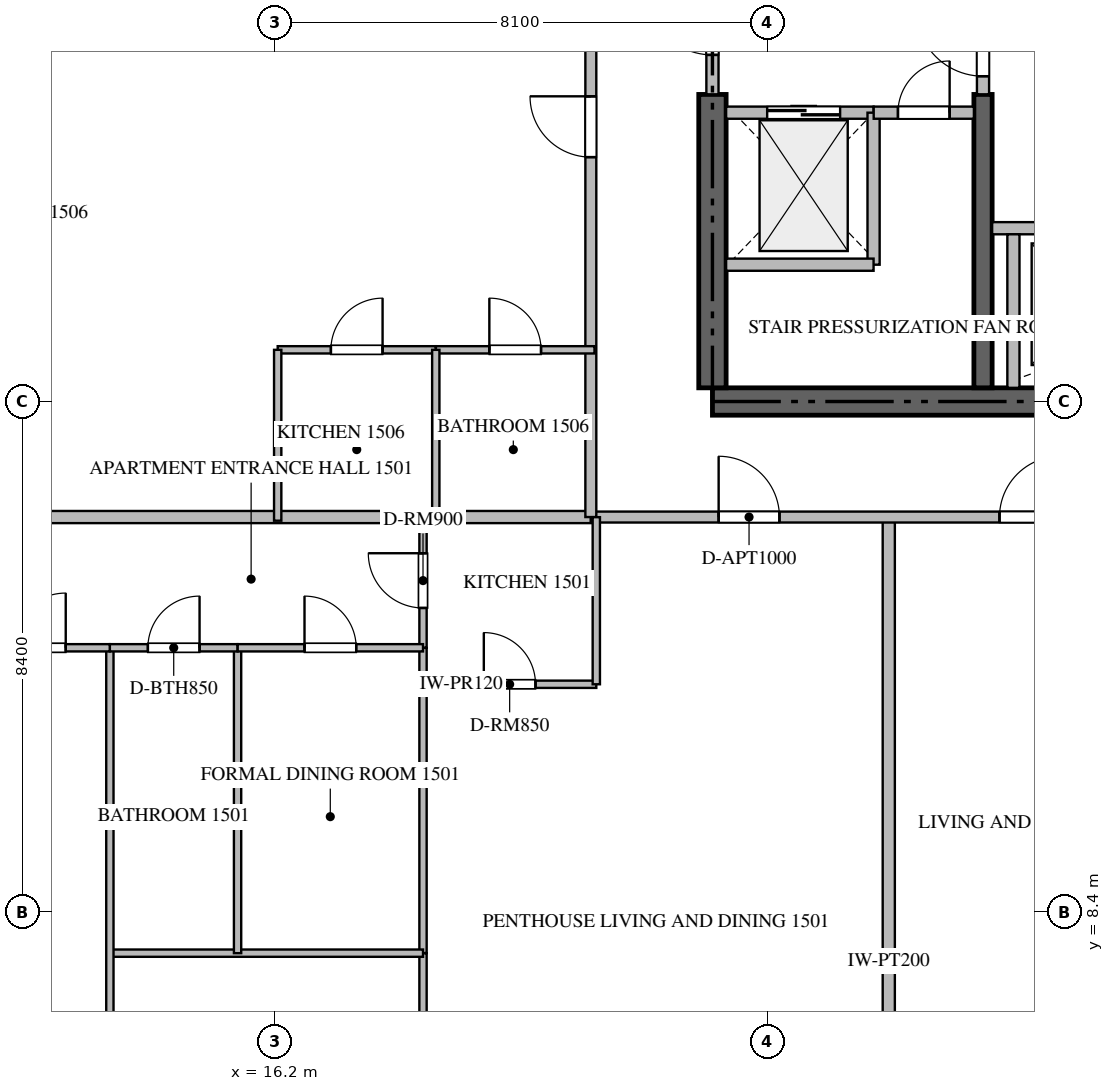
"""IFC4 building model, lengths in metres.
Left out: names, types, materials, properties, quantities, classifications, styles, units other than length and angle.
Written with IfcOpenShell. Run it as: python <this file> out.ifc"""

import sys

from ifc_helpers import new_model, si_unit, direction, frame, frame_2d, origin, place, context, subcontext, project, spatial, rectangle, extrude, source, transform, mapped, element, fill, save


model = new_model("IFC4")
c1 = context("Model", 3, precision=1e-05, world=origin(), true_north=direction((0.0, 1.0)))
c2 = subcontext(c1, "Body", "Model", "MODEL_VIEW")
j1 = project(units=[si_unit("LENGTHUNIT", "METRE"), si_unit("PLANEANGLEUNIT", "RADIAN")], contexts=[c1])
p1 = place(None, origin())
s1 = spatial("IfcSite", under=j1, at=p1, CompositionType="ELEMENT")
p2 = place(p1, origin())
s2 = spatial("IfcBuilding", under=s1, at=p2, CompositionType="ELEMENT")
p3 = place(p2, frame((0.0, 0.0, 64.2)))
s3 = spatial("IfcBuildingStorey", under=s2, at=p3, CompositionType="ELEMENT", Elevation=64.2)
p4 = place(p3, frame((23.4, 16.8, -0.26), z_axis=(0.0, 0.0, 1.0), x_axis=(1.0, 0.0, 0.0)))
e1 = element("IfcWall", 1, at=p4, inside=s3, PredefinedType="SHEAR", context=c2, shape_type="SweptSolid", body=[
    extrude(rectangle(XDim=18.0, YDim=0.45, at=frame_2d((9.0, 0.0))), origin(), (0.0, 0.0, 1.0), 3.748),
])
p5 = place(p3, frame((23.4, 17.025, -0.26), z_axis=(0.0, 0.0, 1.0), x_axis=(0.0, 1.0, 0.0)))
e2 = element("IfcWall", 2, at=p5, inside=s3, PredefinedType="SHEAR", context=c2, shape_type="SweptSolid", body=[
    extrude(rectangle(XDim=4.825, YDim=0.45, at=frame_2d((2.413, 0.0))), origin(), (0.0, 0.0, 1.0), 3.748),
])
p6 = place(p3, frame((27.85, 17.025, -0.26), z_axis=(0.0, 0.0, 1.0), x_axis=(0.0, 1.0, 0.0)))
e3 = element("IfcWall", 3, at=p6, inside=s3, PredefinedType="SHEAR", context=c2, shape_type="SweptSolid", body=[
    extrude(rectangle(XDim=4.825, YDim=0.3, at=frame_2d((2.413, 0.0))), origin(), (0.0, 0.0, 1.0), 3.748),
])
p7 = place(p3, frame((23.625, 21.55, 0.0), z_axis=(0.0, 0.0, 1.0), x_axis=(1.0, 0.0, 0.0)))
e4 = element("IfcWall", 4, at=p7, inside=s3, PredefinedType="STANDARD", context=c2, shape_type="SweptSolid", body=[
    extrude(rectangle(XDim=2.425, YDim=0.2, at=frame_2d((1.212, 0.0))), origin(), (0.0, 0.0, 1.0), 3.49),
])
p8 = place(p7, frame((0.675, 0.0, 0.0)))
e5 = element("IfcOpeningElement", 5, at=p8, cuts=e4, PredefinedType="OPENING", context=c2, shape_type="SweptSolid", body=[
    extrude(rectangle(XDim=1.2, YDim=2.2, at=frame_2d((0.6, 1.1))), frame((0.0, 0.11, 0.0), z_axis=(0.0, -1.0, 0.0), x_axis=(1.0, 0.0, 0.0)), (0.0, 0.0, 1.0), 0.22),
])
p9 = place(p3, frame((28.0, 19.65, 0.0), z_axis=(0.0, 0.0, 1.0), x_axis=(1.0, 0.0, 0.0)))
e6 = element("IfcWall", 6, at=p9, inside=s3, PredefinedType="STANDARD", context=c2, shape_type="SweptSolid", body=[
    extrude(rectangle(XDim=2.65, YDim=0.2, at=frame_2d((1.325, 0.0))), origin(), (0.0, 0.0, 1.0), 3.49),
])
p10 = place(p9, frame((0.9, 0.0, 0.0)))
e7 = element("IfcOpeningElement", 7, at=p10, cuts=e6, PredefinedType="OPENING", context=c2, shape_type="SweptSolid", body=[
    extrude(rectangle(XDim=1.1, YDim=2.2, at=frame_2d((0.55, 1.1))), frame((0.0, 0.11, 0.0), z_axis=(0.0, -1.0, 0.0), x_axis=(1.0, 0.0, 0.0)), (0.0, 0.0, 1.0), 0.22),
])
p11 = place(p3, frame((28.35, 17.025, 0.0), z_axis=(0.0, 0.0, 1.0), x_axis=(0.0, 1.0, 0.0)))
e8 = element("IfcWall", 8, at=p11, inside=s3, PredefinedType="STANDARD", context=c2, shape_type="SweptSolid", body=[
    extrude(rectangle(XDim=2.525, YDim=0.2, at=frame_2d((1.263, 0.0))), origin(), (0.0, 0.0, 1.0), 3.49),
])
p12 = place(p3, frame((26.05, 19.05, 0.0), z_axis=(0.0, 0.0, 1.0), x_axis=(0.0, 1.0, 0.0)))
e9 = element("IfcWall", 9, at=p12, inside=s3, PredefinedType="STANDARD", context=c2, shape_type="SweptSolid", body=[
    extrude(rectangle(XDim=2.5, YDim=0.2, at=frame_2d((1.25, 0.0))), origin(), (0.0, 0.0, 1.0), 3.49),
])
p13 = place(p3, frame((23.625, 19.05, 0.0), z_axis=(0.0, 0.0, 1.0), x_axis=(1.0, 0.0, 0.0)))
e10 = element("IfcWall", 10, at=p13, inside=s3, PredefinedType="STANDARD", context=c2, shape_type="SweptSolid", body=[
    extrude(rectangle(XDim=2.425, YDim=0.2, at=frame_2d((1.212, 0.0))), origin(), (0.0, 0.0, 1.0), 3.49),
])
p14 = place(p3, frame((26.052, 21.55, 0.0), z_axis=(0.0, 0.0, 1.0), x_axis=(1.0, 0.0, 0.0)))
e11 = element("IfcWall", 11, at=p14, inside=s3, PredefinedType="STANDARD", context=c2, shape_type="SweptSolid", body=[
    extrude(rectangle(XDim=1.648, YDim=0.2, at=frame_2d((0.824, 0.0))), origin(), (0.0, 0.0, 1.0), 3.49),
])
p15 = place(p14, frame((0.399, 0.0, 0.0)))
e12 = element("IfcOpeningElement", 12, at=p15, cuts=e11, PredefinedType="OPENING", context=c2, shape_type="SweptSolid", body=[
    extrude(rectangle(XDim=0.85, YDim=2.1, at=frame_2d((0.425, 1.05))), frame((0.0, 0.11, 0.0), z_axis=(0.0, -1.0, 0.0), x_axis=(1.0, 0.0, 0.0)), (0.0, 0.0, 1.0), 0.22),
])
p16 = place(p3, frame((23.4, 21.852, 0.0), z_axis=(0.0, 0.0, 1.0), x_axis=(0.0, 1.0, 0.0)))
e13 = element("IfcWall", 13, at=p16, inside=s3, PredefinedType="STANDARD", context=c2, shape_type="SweptSolid", body=[
    extrude(rectangle(XDim=2.396, YDim=0.2, at=frame_2d((1.198, 0.0))), origin(), (0.0, 0.0, 1.0), 3.49),
])
p17 = place(p16, frame((0.648, 0.0, 0.0)))
e14 = element("IfcOpeningElement", 14, at=p17, cuts=e13, PredefinedType="OPENING", context=c2, shape_type="SweptSolid", body=[
    extrude(rectangle(XDim=1.1, YDim=2.15, at=frame_2d((0.55, 1.075))), frame((0.0, 0.11, 0.0), z_axis=(0.0, -1.0, 0.0), x_axis=(1.0, 0.0, 0.0)), (0.0, 0.0, 1.0), 0.22),
])
p18 = place(p3, frame((27.85, 21.852, 0.0), z_axis=(0.0, 0.0, 1.0), x_axis=(0.0, 1.0, 0.0)))
e15 = element("IfcWall", 15, at=p18, inside=s3, PredefinedType="STANDARD", context=c2, shape_type="SweptSolid", body=[
    extrude(rectangle(XDim=1.696, YDim=0.2, at=frame_2d((0.848, 0.0))), origin(), (0.0, 0.0, 1.0), 3.49),
])
p19 = place(p18, frame((0.298, 0.0, 0.0)))
e16 = element("IfcOpeningElement", 16, at=p19, cuts=e15, PredefinedType="OPENING", context=c2, shape_type="SweptSolid", body=[
    extrude(rectangle(XDim=1.1, YDim=2.15, at=frame_2d((0.55, 1.075))), frame((0.0, 0.11, 0.0), z_axis=(0.0, -1.0, 0.0), x_axis=(1.0, 0.0, 0.0)), (0.0, 0.0, 1.0), 0.22),
])
p20 = place(p3, frame((26.3, 0.282, 0.0), z_axis=(0.0, 0.0, 1.0), x_axis=(0.0, 1.0, 0.0)))
e17 = element("IfcWall", 17, at=p20, inside=s3, PredefinedType="PARTITIONING", context=c2, shape_type="SweptSolid", body=[
    extrude(rectangle(XDim=14.618, YDim=0.2, at=frame_2d((7.309, 0.0))), origin(), (0.0, 0.0, 1.0), 3.49),
])
p21 = place(p3, frame((6.082, 14.9, 0.0), z_axis=(0.0, 0.0, 1.0), x_axis=(1.0, 0.0, 0.0)))
e18 = element("IfcWall", 18, at=p21, inside=s3, PredefinedType="PARTITIONING", context=c2, shape_type="SweptSolid", body=[
    extrude(rectangle(XDim=15.318, YDim=0.2, at=frame_2d((7.659, 0.0))), origin(), (0.0, 0.0, 1.0), 3.49),
])
p22 = place(p3, frame((21.402, 14.9, 0.0), z_axis=(0.0, 0.0, 1.0), x_axis=(1.0, 0.0, 0.0)))
e19 = element("IfcWall", 19, at=p22, inside=s3, PredefinedType="PARTITIONING", context=c2, shape_type="SweptSolid", body=[
    extrude(rectangle(XDim=21.996, YDim=0.18, at=frame_2d((10.998, 0.0))), origin(), (0.0, 0.0, 1.0), 3.49),
])
p23 = place(p22, frame((2.1, 0.0, 0.0)))
e20 = element("IfcOpeningElement", 20, at=p23, cuts=e19, PredefinedType="OPENING", context=c2, shape_type="SweptSolid", body=[
    extrude(rectangle(XDim=1.0, YDim=2.15, at=frame_2d((0.5, 1.075))), frame((0.0, 0.1, 0.0), z_axis=(0.0, -1.0, 0.0), x_axis=(1.0, 0.0, 0.0)), (0.0, 0.0, 1.0), 0.2),
])
p24 = place(p22, frame((6.719, 0.0, 0.0)))
e21 = element("IfcOpeningElement", 21, at=p24, cuts=e19, PredefinedType="OPENING", context=c2, shape_type="SweptSolid", body=[
    extrude(rectangle(XDim=1.0, YDim=2.15, at=frame_2d((0.5, 1.075))), frame((0.0, 0.1, 0.0), z_axis=(0.0, -1.0, 0.0), x_axis=(1.0, 0.0, 0.0)), (0.0, 0.0, 1.0), 0.2),
])
p25 = place(p22, frame((18.896, 0.0, 0.0)))
e22 = element("IfcOpeningElement", 22, at=p25, cuts=e19, PredefinedType="OPENING", context=c2, shape_type="SweptSolid", body=[
    extrude(rectangle(XDim=1.0, YDim=2.15, at=frame_2d((0.5, 1.075))), frame((0.0, 0.1, 0.0), z_axis=(0.0, -1.0, 0.0), x_axis=(1.0, 0.0, 0.0)), (0.0, 0.0, 1.0), 0.2),
])
p26 = place(p3, frame((21.4, 14.9, 0.0), z_axis=(0.0, 0.0, 1.0), x_axis=(0.0, 1.0, 0.0)))
e23 = element("IfcWall", 23, at=p26, inside=s3, PredefinedType="PARTITIONING", context=c2, shape_type="SweptSolid", body=[
    extrude(rectangle(XDim=20.6, YDim=0.18, at=frame_2d((10.3, 0.0))), origin(), (0.0, 0.0, 1.0), 3.49),
])
p27 = place(p26, frame((5.919, 0.0, 0.0)))
e24 = element("IfcOpeningElement", 24, at=p27, cuts=e23, PredefinedType="OPENING", context=c2, shape_type="SweptSolid", body=[
    extrude(rectangle(XDim=1.0, YDim=2.15, at=frame_2d((0.5, 1.075))), frame((0.0, 0.1, 0.0), z_axis=(0.0, -1.0, 0.0), x_axis=(1.0, 0.0, 0.0)), (0.0, 0.0, 1.0), 0.2),
])
p28 = place(p26, frame((17.64, 0.0, 0.0)))
e25 = element("IfcOpeningElement", 25, at=p28, cuts=e23, PredefinedType="OPENING", context=c2, shape_type="SweptSolid", body=[
    extrude(rectangle(XDim=1.0, YDim=2.15, at=frame_2d((0.5, 1.075))), frame((0.0, 0.1, 0.0), z_axis=(0.0, -1.0, 0.0), x_axis=(1.0, 0.0, 0.0)), (0.0, 0.0, 1.0), 0.2),
])
p29 = place(p3, frame((18.64, 12.15, 0.0), z_axis=(0.0, 0.0, 1.0), x_axis=(1.0, 0.0, 0.0)))
e26 = element("IfcWall", 26, at=p29, inside=s3, PredefinedType="PARTITIONING", context=c2, shape_type="SweptSolid", body=[
    extrude(rectangle(XDim=2.85, YDim=0.12, at=frame_2d((1.425, 0.0))), origin(), (0.0, 0.0, 1.0), 3.49),
])
p30 = place(p29, frame((1.0, 0.0, 0.0)))
e27 = element("IfcOpeningElement", 27, at=p30, cuts=e26, PredefinedType="OPENING", context=c2, shape_type="SweptSolid", body=[
    extrude(rectangle(XDim=0.85, YDim=2.1, at=frame_2d((0.425, 1.05))), frame((0.0, 0.07, 0.0), z_axis=(0.0, -1.0, 0.0), x_axis=(1.0, 0.0, 0.0)), (0.0, 0.0, 1.0), 0.14),
])
p31 = place(p3, frame((21.49, 12.15, 0.0), z_axis=(0.0, 0.0, 1.0), x_axis=(0.0, 1.0, 0.0)))
e28 = element("IfcWall", 28, at=p31, inside=s3, PredefinedType="PARTITIONING", context=c2, shape_type="SweptSolid", body=[
    extrude(rectangle(XDim=2.748, YDim=0.12, at=frame_2d((1.374, 0.0))), origin(), (0.0, 0.0, 1.0), 3.49),
])
p32 = place(p3, frame((18.64, 12.75, 0.0), z_axis=(0.0, 0.0, 1.0), x_axis=(0.0, 1.0, 0.0)))
e29 = element("IfcWall", 29, at=p32, inside=s3, PredefinedType="PARTITIONING", context=c2, shape_type="SweptSolid", body=[
    extrude(rectangle(XDim=2.21, YDim=0.12, at=frame_2d((1.105, 0.0))), origin(), (0.0, 0.0, 1.0), 3.49),
])
p33 = place(p32, frame((0.655, 0.0, 0.0)))
e30 = element("IfcOpeningElement", 30, at=p33, cuts=e29, PredefinedType="OPENING", context=c2, shape_type="SweptSolid", body=[
    extrude(rectangle(XDim=0.9, YDim=2.1, at=frame_2d((0.45, 1.05))), frame((0.0, 0.07, 0.0), z_axis=(0.0, -1.0, 0.0), x_axis=(1.0, 0.0, 0.0)), (0.0, 0.0, 1.0), 0.14),
])
p34 = place(p3, frame((18.64, 0.295, 0.0), z_axis=(0.0, 0.0, 1.0), x_axis=(0.0, 1.0, 0.0)))
e31 = element("IfcWall", 31, at=p34, inside=s3, PredefinedType="PARTITIONING", context=c2, shape_type="SweptSolid", body=[
    extrude(rectangle(XDim=7.433, YDim=0.12, at=frame_2d((3.717, 0.0))), origin(), (0.0, 0.0, 1.0), 3.49),
])
p35 = place(p34, frame((3.593, 0.0, 0.0)))
e32 = element("IfcOpeningElement", 32, at=p35, cuts=e31, PredefinedType="OPENING", context=c2, shape_type="SweptSolid", body=[
    extrude(rectangle(XDim=0.9, YDim=2.1, at=frame_2d((0.45, 1.05))), frame((0.0, 0.07, 0.0), z_axis=(0.0, -1.0, 0.0), x_axis=(1.0, 0.0, 0.0)), (0.0, 0.0, 1.0), 0.14),
])
p36 = place(p3, frame((18.64, 7.73, 0.0), z_axis=(0.0, 0.0, 1.0), x_axis=(0.0, 1.0, 0.0)))
e33 = element("IfcWall", 33, at=p36, inside=s3, PredefinedType="PARTITIONING", context=c2, shape_type="SweptSolid", body=[
    extrude(rectangle(XDim=5.018, YDim=0.12, at=frame_2d((2.509, 0.0))), origin(), (0.0, 0.0, 1.0), 3.49),
])
p37 = place(p3, frame((13.49, 7.728, 0.0), z_axis=(0.0, 0.0, 1.0), x_axis=(1.0, 0.0, 0.0)))
e34 = element("IfcWall", 34, at=p37, inside=s3, PredefinedType="PARTITIONING", context=c2, shape_type="SweptSolid", body=[
    extrude(rectangle(XDim=5.15, YDim=0.12, at=frame_2d((2.575, 0.0))), origin(), (0.0, 0.0, 1.0), 3.49),
])
p38 = place(p3, frame((13.49, 4.495, 0.0), z_axis=(0.0, 0.0, 1.0), x_axis=(0.0, 1.0, 0.0)))
e35 = element("IfcWall", 35, at=p38, inside=s3, PredefinedType="PARTITIONING", context=c2, shape_type="SweptSolid", body=[
    extrude(rectangle(XDim=8.255, YDim=0.12, at=frame_2d((4.127, 0.0))), origin(), (0.0, 0.0, 1.0), 3.49),
])
p39 = place(p3, frame((15.59, 7.728, 0.0), z_axis=(0.0, 0.0, 1.0), x_axis=(0.0, 1.0, 0.0)))
e36 = element("IfcWall", 36, at=p39, inside=s3, PredefinedType="PARTITIONING", context=c2, shape_type="SweptSolid", body=[
    extrude(rectangle(XDim=5.022, YDim=0.12, at=frame_2d((2.511, 0.0))), origin(), (0.0, 0.0, 1.0), 3.49),
])
p40 = place(p3, frame((13.49, 12.75, 0.0), z_axis=(0.0, 0.0, 1.0), x_axis=(1.0, 0.0, 0.0)))
e37 = element("IfcWall", 37, at=p40, inside=s3, PredefinedType="PARTITIONING", context=c2, shape_type="SweptSolid", body=[
    extrude(rectangle(XDim=2.1, YDim=0.12, at=frame_2d((1.05, 0.0))), origin(), (0.0, 0.0, 1.0), 3.49),
])
p41 = place(p40, frame((0.625, 0.0, 0.0)))
e38 = element("IfcOpeningElement", 38, at=p41, cuts=e37, PredefinedType="OPENING", context=c2, shape_type="SweptSolid", body=[
    extrude(rectangle(XDim=0.85, YDim=2.1, at=frame_2d((0.425, 1.05))), frame((0.0, 0.07, 0.0), z_axis=(0.0, -1.0, 0.0), x_axis=(1.0, 0.0, 0.0)), (0.0, 0.0, 1.0), 0.14),
])
p42 = place(p3, frame((15.592, 12.75, 0.0), z_axis=(0.0, 0.0, 1.0), x_axis=(1.0, 0.0, 0.0)))
e39 = element("IfcWall", 39, at=p42, inside=s3, PredefinedType="PARTITIONING", context=c2, shape_type="SweptSolid", body=[
    extrude(rectangle(XDim=3.048, YDim=0.12, at=frame_2d((1.524, 0.0))), origin(), (0.0, 0.0, 1.0), 3.49),
])
p43 = place(p42, frame((1.099, 0.0, 0.0)))
e40 = element("IfcOpeningElement", 40, at=p43, cuts=e39, PredefinedType="OPENING", context=c2, shape_type="SweptSolid", body=[
    extrude(rectangle(XDim=0.85, YDim=2.1, at=frame_2d((0.425, 1.05))), frame((0.0, 0.07, 0.0), z_axis=(0.0, -1.0, 0.0), x_axis=(1.0, 0.0, 0.0)), (0.0, 0.0, 1.0), 0.14),
])
p44 = place(p3, frame((11.14, 12.75, 0.0), z_axis=(0.0, 0.0, 1.0), x_axis=(1.0, 0.0, 0.0)))
e41 = element("IfcWall", 41, at=p44, inside=s3, PredefinedType="PARTITIONING", context=c2, shape_type="SweptSolid", body=[
    extrude(rectangle(XDim=2.348, YDim=0.12, at=frame_2d((1.174, 0.0))), origin(), (0.0, 0.0, 1.0), 3.49),
])
p45 = place(p44, frame((0.724, 0.0, 0.0)))
e42 = element("IfcOpeningElement", 42, at=p45, cuts=e41, PredefinedType="OPENING", context=c2, shape_type="SweptSolid", body=[
    extrude(rectangle(XDim=0.9, YDim=2.1, at=frame_2d((0.45, 1.05))), frame((0.0, 0.07, 0.0), z_axis=(0.0, -1.0, 0.0), x_axis=(1.0, 0.0, 0.0)), (0.0, 0.0, 1.0), 0.14),
])
p46 = place(p3, frame((16.25, 17.65, 0.0), z_axis=(0.0, 0.0, 1.0), x_axis=(1.0, 0.0, 0.0)))
e43 = element("IfcWall", 43, at=p46, inside=s3, PredefinedType="PARTITIONING", context=c2, shape_type="SweptSolid", body=[
    extrude(rectangle(XDim=2.6, YDim=0.12, at=frame_2d((1.3, 0.0))), origin(), (0.0, 0.0, 1.0), 3.49),
])
p47 = place(p46, frame((0.875, 0.0, 0.0)))
e44 = element("IfcOpeningElement", 44, at=p47, cuts=e43, PredefinedType="OPENING", context=c2, shape_type="SweptSolid", body=[
    extrude(rectangle(XDim=0.85, YDim=2.1, at=frame_2d((0.425, 1.05))), frame((0.0, 0.07, 0.0), z_axis=(0.0, -1.0, 0.0), x_axis=(1.0, 0.0, 0.0)), (0.0, 0.0, 1.0), 0.14),
])
p48 = place(p3, frame((18.852, 17.65, 0.0), z_axis=(0.0, 0.0, 1.0), x_axis=(1.0, 0.0, 0.0)))
e45 = element("IfcWall", 45, at=p48, inside=s3, PredefinedType="PARTITIONING", context=c2, shape_type="SweptSolid", body=[
    extrude(rectangle(XDim=2.608, YDim=0.12, at=frame_2d((1.304, 0.0))), origin(), (0.0, 0.0, 1.0), 3.49),
])
p49 = place(p48, frame((0.879, 0.0, 0.0)))
e46 = element("IfcOpeningElement", 46, at=p49, cuts=e45, PredefinedType="OPENING", context=c2, shape_type="SweptSolid", body=[
    extrude(rectangle(XDim=0.85, YDim=2.1, at=frame_2d((0.425, 1.05))), frame((0.0, 0.07, 0.0), z_axis=(0.0, -1.0, 0.0), x_axis=(1.0, 0.0, 0.0)), (0.0, 0.0, 1.0), 0.14),
])
for number, where, z_axis, x_axis in (
    (47, (18.85, 14.84, 0.0), (0.0, 0.0, 1.0), (0.0, 1.0, 0.0)),
    (48, (16.25, 14.84, 0.0), (0.0, 0.0, 1.0), (0.0, 1.0, 0.0)),
):
    element("IfcWall", number, at=place(p3, frame(where, z_axis=z_axis, x_axis=x_axis)), inside=s3, PredefinedType="PARTITIONING", context=c2, shape_type="SweptSolid", body=[
        extrude(rectangle(XDim=2.81, YDim=0.12, at=frame_2d((1.405, 0.0))), origin(), (0.0, 0.0, 1.0), 3.49),
    ])
m1 = source(origin(), c2, "Body", "SweptSolid", [
    extrude(rectangle(XDim=1.2, YDim=2.2, at=frame_2d((0.6, 1.1))), frame((0.0, 0.025, 0.0), z_axis=(0.0, -1.0, 0.0), x_axis=(1.0, 0.0, 0.0)), (0.0, 0.0, 1.0), 0.05),
])
p50 = place(p8, origin())
e49 = element("IfcDoor", 49, at=p50, inside=s3, OperationType="DOUBLE_DOOR_SLIDING", PredefinedType="DOOR", context=c2, shape_type="MappedRepresentation", body=[
    mapped(m1, transform((0.0, 0.0, 0.0), scale=1.0)),
])
fill(e5, e49)
m2 = source(origin(), c2, "Body", "SweptSolid", [
    extrude(rectangle(XDim=0.85, YDim=2.1, at=frame_2d((0.425, 1.05))), frame((0.0, 0.025, 0.0), z_axis=(0.0, -1.0, 0.0), x_axis=(1.0, 0.0, 0.0)), (0.0, 0.0, 1.0), 0.05),
])
p51 = place(p15, origin())
e50 = element("IfcDoor", 50, at=p51, inside=s3, OperationType="SINGLE_SWING_RIGHT", PredefinedType="DOOR", context=c2, shape_type="MappedRepresentation", body=[
    mapped(m2, transform((0.0, 0.0, 0.0), scale=1.0)),
])
fill(e12, e50)
m3 = source(origin(), c2, "Body", "SweptSolid", [
    extrude(rectangle(XDim=1.1, YDim=2.15, at=frame_2d((0.55, 1.075))), frame((0.0, 0.025, 0.0), z_axis=(0.0, -1.0, 0.0), x_axis=(1.0, 0.0, 0.0)), (0.0, 0.0, 1.0), 0.05),
])
p52 = place(p17, origin())
e51 = element("IfcDoor", 51, at=p52, inside=s3, OperationType="SINGLE_SWING_RIGHT", PredefinedType="DOOR", context=c2, shape_type="MappedRepresentation", body=[
    mapped(m3, transform((0.0, 0.0, 0.0), scale=1.0)),
])
fill(e14, e51)
p53 = place(p19, origin())
e52 = element("IfcDoor", 52, at=p53, inside=s3, OperationType="SINGLE_SWING_RIGHT", PredefinedType="DOOR", context=c2, shape_type="MappedRepresentation", body=[
    mapped(m3, transform((0.0, 0.0, 0.0), scale=1.0)),
])
fill(e16, e52)
m4 = source(origin(), c2, "Body", "SweptSolid", [
    extrude(rectangle(XDim=1.0, YDim=2.15, at=frame_2d((0.5, 1.075))), frame((0.0, 0.025, 0.0), z_axis=(0.0, -1.0, 0.0), x_axis=(1.0, 0.0, 0.0)), (0.0, 0.0, 1.0), 0.05),
])
p54 = place(p23, origin())
e53 = element("IfcDoor", 53, at=p54, inside=s3, OperationType="SINGLE_SWING_LEFT", PredefinedType="DOOR", context=c2, shape_type="MappedRepresentation", body=[
    mapped(m4, transform((0.0, 0.0, 0.0), scale=1.0)),
])
fill(e20, e53)
p55 = place(p24, origin())
e54 = element("IfcDoor", 54, at=p55, inside=s3, OperationType="SINGLE_SWING_RIGHT", PredefinedType="DOOR", context=c2, shape_type="MappedRepresentation", body=[
    mapped(m4, transform((0.0, 0.0, 0.0), scale=1.0)),
])
fill(e21, e54)
p56 = place(p27, origin())
e55 = element("IfcDoor", 55, at=p56, inside=s3, OperationType="SINGLE_SWING_RIGHT", PredefinedType="DOOR", context=c2, shape_type="MappedRepresentation", body=[
    mapped(m4, transform((0.0, 0.0, 0.0), scale=1.0)),
])
fill(e24, e55)
p57 = place(p30, origin())
e56 = element("IfcDoor", 56, at=p57, inside=s3, OperationType="SINGLE_SWING_LEFT", PredefinedType="DOOR", context=c2, shape_type="MappedRepresentation", body=[
    mapped(m2, transform((0.0, 0.0, 0.0), scale=1.0)),
])
fill(e27, e56)
m5 = source(origin(), c2, "Body", "SweptSolid", [
    extrude(rectangle(XDim=0.9, YDim=2.1, at=frame_2d((0.45, 1.05))), frame((0.0, 0.025, 0.0), z_axis=(0.0, -1.0, 0.0), x_axis=(1.0, 0.0, 0.0)), (0.0, 0.0, 1.0), 0.05),
])
p58 = place(p33, origin())
e57 = element("IfcDoor", 57, at=p58, inside=s3, OperationType="SINGLE_SWING_RIGHT", PredefinedType="DOOR", context=c2, shape_type="MappedRepresentation", body=[
    mapped(m5, transform((0.0, 0.0, 0.0), scale=1.0)),
])
fill(e30, e57)
p59 = place(p41, origin())
e58 = element("IfcDoor", 58, at=p59, inside=s3, OperationType="SINGLE_SWING_RIGHT", PredefinedType="DOOR", context=c2, shape_type="MappedRepresentation", body=[
    mapped(m2, transform((0.0, 0.0, 0.0), scale=1.0)),
])
fill(e38, e58)
p60 = place(p43, origin())
e59 = element("IfcDoor", 59, at=p60, inside=s3, OperationType="SINGLE_SWING_LEFT", PredefinedType="DOOR", context=c2, shape_type="MappedRepresentation", body=[
    mapped(m2, transform((0.0, 0.0, 0.0), scale=1.0)),
])
fill(e40, e59)
p61 = place(p45, origin())
e60 = element("IfcDoor", 60, at=p61, inside=s3, OperationType="SINGLE_SWING_RIGHT", PredefinedType="DOOR", context=c2, shape_type="MappedRepresentation", body=[
    mapped(m5, transform((0.0, 0.0, 0.0), scale=1.0)),
])
fill(e42, e60)
p62 = place(p47, origin())
e61 = element("IfcDoor", 61, at=p62, inside=s3, OperationType="SINGLE_SWING_RIGHT", PredefinedType="DOOR", context=c2, shape_type="MappedRepresentation", body=[
    mapped(m2, transform((0.0, 0.0, 0.0), scale=1.0)),
])
fill(e44, e61)
p63 = place(p49, origin())
e62 = element("IfcDoor", 62, at=p63, inside=s3, OperationType="SINGLE_SWING_LEFT", PredefinedType="DOOR", context=c2, shape_type="MappedRepresentation", body=[
    mapped(m2, transform((0.0, 0.0, 0.0), scale=1.0)),
])
fill(e46, e62)
save(model, sys.argv[1])
